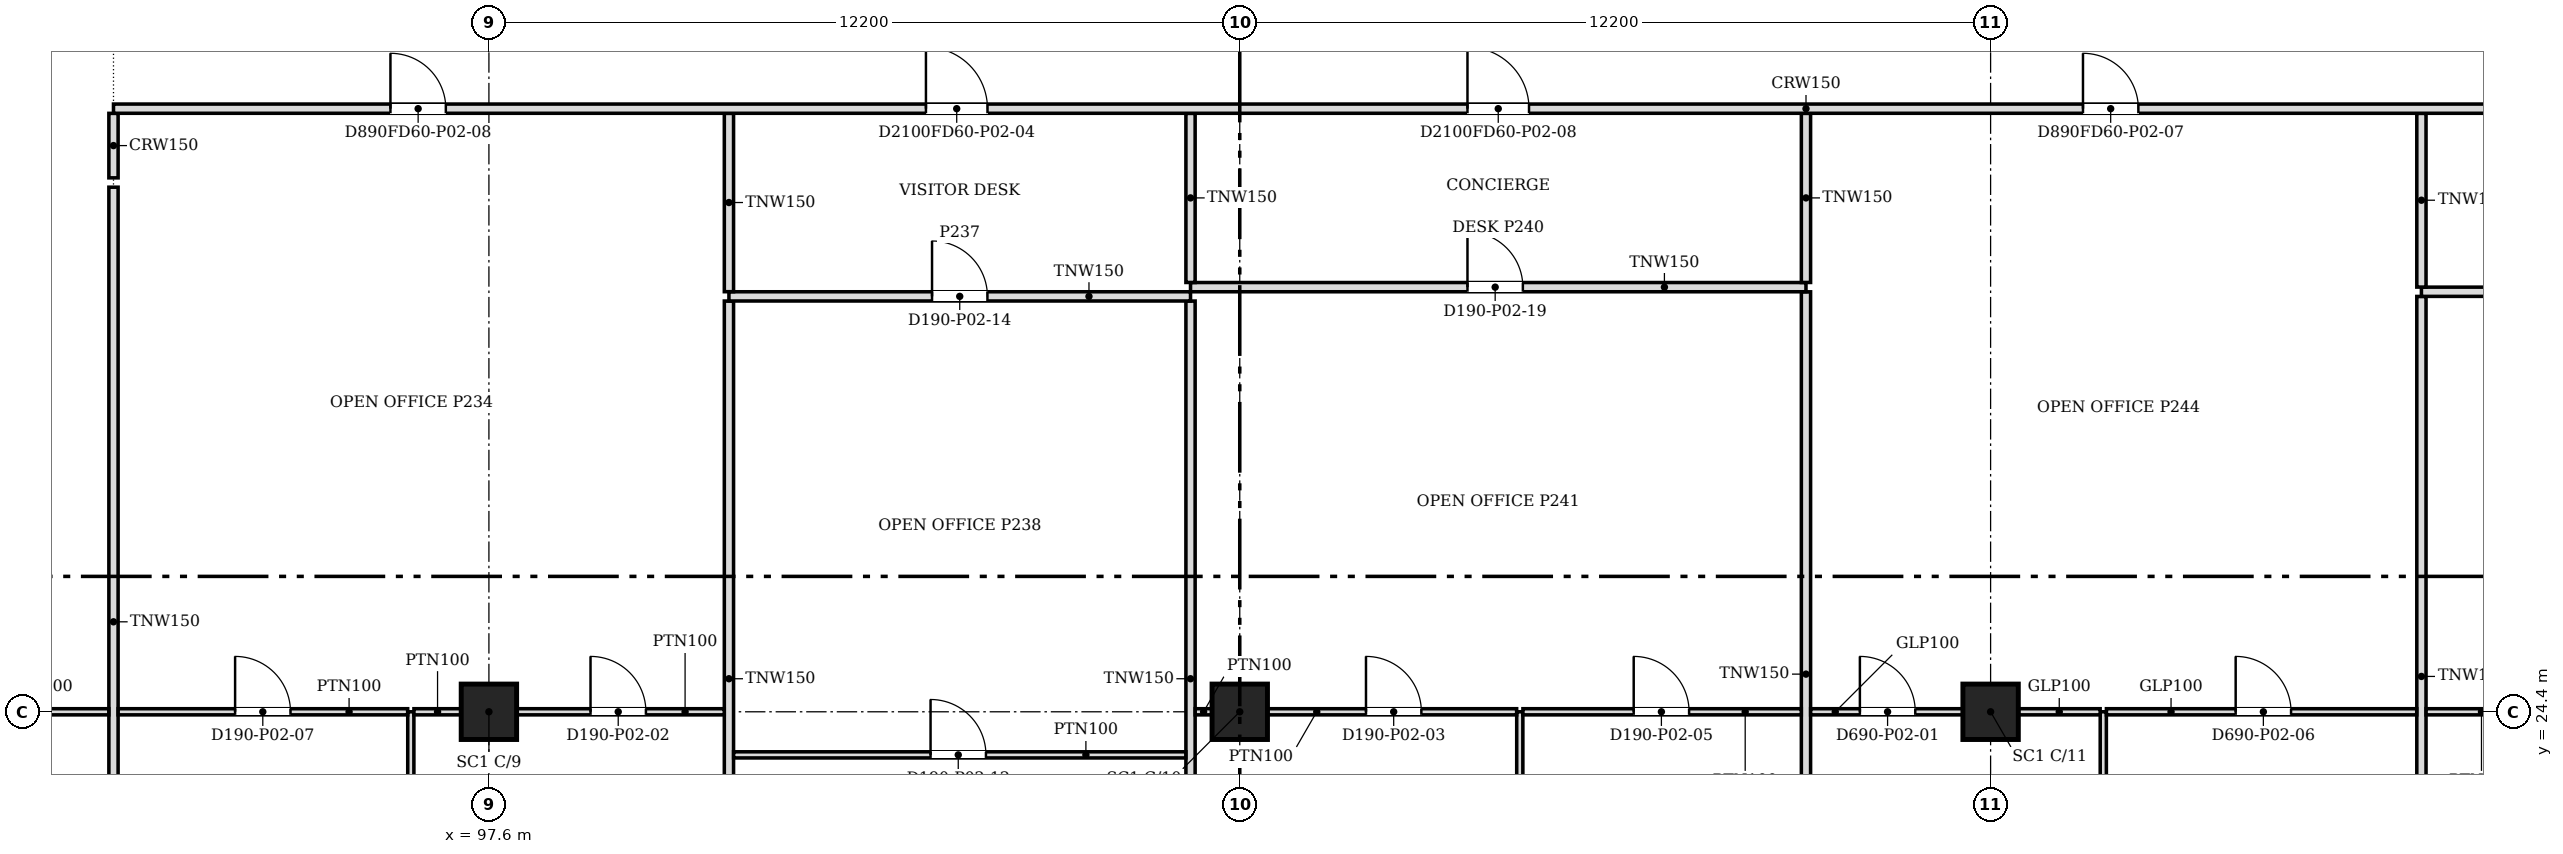
"""IFC4 building model, lengths in metres.
Left out: names, types, materials, properties, quantities, classifications, styles, units other than length and angle.
Written with IfcOpenShell. Run it as: python <this file> out.ifc"""

import sys

from ifc_helpers import new_model, si_unit, direction, frame, frame_2d, origin, origin_2d, place, context, subcontext, project, spatial, rectangle, extrude, source, transform, mapped, element, fill, save


model = new_model("IFC4")
c1 = context("Model", 3, precision=1e-05, world=origin(), true_north=direction((0.0, 1.0)))
c2 = subcontext(c1, "Body", "Model", "MODEL_VIEW")
j1 = project(units=[si_unit("LENGTHUNIT", "METRE"), si_unit("PLANEANGLEUNIT", "RADIAN")], contexts=[c1])
p1 = place(None, origin())
s1 = spatial("IfcSite", under=j1, at=p1, CompositionType="ELEMENT")
p2 = place(p1, origin())
s2 = spatial("IfcBuilding", under=s1, at=p2, CompositionType="ELEMENT")
p3 = place(p2, frame((0.0, 0.0, 7.2)))
s3 = spatial("IfcBuildingStorey", under=s2, at=p3, CompositionType="ELEMENT", Elevation=7.2)
for number, where, z_axis, x_axis in (
    (1, (97.6, 24.4, 0.0), (0.0, 0.0, 1.0), (1.0, 0.0, 0.0)),
    (2, (109.8, 24.4, 0.0), (0.0, 0.0, 1.0), (1.0, 0.0, 0.0)),
    (3, (122.0, 24.4, 0.0), (0.0, 0.0, 1.0), (1.0, 0.0, 0.0)),
):
    element("IfcColumn", number, at=place(p3, frame(where, z_axis=z_axis, x_axis=x_axis)), inside=s3, PredefinedType="COLUMN", context=c2, shape_type="SweptSolid", body=[
        extrude(rectangle(XDim=0.9, YDim=0.9, at=origin_2d()), origin(), (0.0, 0.0, 1.0), 4.55),
    ])
p4 = place(p3, frame((91.5, 18.8, 0.0), z_axis=(0.0, 0.0, 1.0), x_axis=(0.0, 1.0, 0.0)))
e4 = element("IfcWall", 4, at=p4, inside=s3, PredefinedType="PARTITIONING", context=c2, shape_type="SweptSolid", body=[
    extrude(rectangle(XDim=14.124, YDim=0.15, at=frame_2d((7.062, 0.0))), origin(), (0.0, 0.0, 1.0), 3.715),
])
p5 = place(p3, frame((96.331, 18.8, 0.0), z_axis=(0.0, 0.0, 1.0), x_axis=(0.0, 1.0, 0.0)))
e5 = element("IfcWall", 5, at=p5, inside=s3, PredefinedType="PARTITIONING", context=c2, shape_type="SweptSolid", body=[
    extrude(rectangle(XDim=5.6, YDim=0.1, at=frame_2d((2.8, 0.0))), origin(), (0.0, 0.0, 1.0), 3.715),
])
for number, where, z_axis, x_axis in (
    (6, (101.5, 18.8, 0.0), (0.0, 0.0, 1.0), (0.0, 1.0, 0.0)),
    (7, (109.0, 18.8, 0.0), (0.0, 0.0, 1.0), (0.0, 1.0, 0.0)),
):
    element("IfcWall", number, at=place(p3, frame(where, z_axis=z_axis, x_axis=x_axis)), inside=s3, PredefinedType="PARTITIONING", context=c2, shape_type="SweptSolid", body=[
        extrude(rectangle(XDim=12.274, YDim=0.15, at=frame_2d((6.137, 0.0))), origin(), (0.0, 0.0, 1.0), 3.715),
    ])
p6 = place(p3, frame((114.35, 18.8, 0.0), z_axis=(0.0, 0.0, 1.0), x_axis=(0.0, 1.0, 0.0)))
e8 = element("IfcWall", 8, at=p6, inside=s3, PredefinedType="PARTITIONING", context=c2, shape_type="SweptSolid", body=[
    extrude(rectangle(XDim=5.6, YDim=0.1, at=frame_2d((2.8, 0.0))), origin(), (0.0, 0.0, 1.0), 3.715),
])
p7 = place(p3, frame((119.0, 18.8, 0.0), z_axis=(0.0, 0.0, 1.0), x_axis=(0.0, 1.0, 0.0)))
e9 = element("IfcWall", 9, at=p7, inside=s3, PredefinedType="PARTITIONING", context=c2, shape_type="SweptSolid", body=[
    extrude(rectangle(XDim=12.424, YDim=0.15, at=frame_2d((6.212, 0.0))), origin(), (0.0, 0.0, 1.0), 3.715),
])
p8 = place(p3, frame((123.831, 18.8, 0.0), z_axis=(0.0, 0.0, 1.0), x_axis=(0.0, 1.0, 0.0)))
e10 = element("IfcWall", 10, at=p8, inside=s3, PredefinedType="PARTITIONING", context=c2, shape_type="SweptSolid", body=[
    extrude(rectangle(XDim=5.6, YDim=0.1, at=frame_2d((2.8, 0.0))), origin(), (0.0, 0.0, 1.0), 3.715),
])
p9 = place(p3, frame((129.0, 18.8, 0.0), z_axis=(0.0, 0.0, 1.0), x_axis=(0.0, 1.0, 0.0)))
e11 = element("IfcWall", 11, at=p9, inside=s3, PredefinedType="PARTITIONING", context=c2, shape_type="SweptSolid", body=[
    extrude(rectangle(XDim=12.349, YDim=0.15, at=frame_2d((6.174, 0.0))), origin(), (0.0, 0.0, 1.0), 3.715),
])
p10 = place(p3, frame((108.924, 23.7, 0.0), z_axis=(0.0, 0.0, 1.0), x_axis=(-1.0, 0.0, 0.0)))
e12 = element("IfcWall", 12, at=p10, inside=s3, PredefinedType="PARTITIONING", context=c2, shape_type="SweptSolid", body=[
    extrude(rectangle(XDim=7.348, YDim=0.1, at=frame_2d((3.674, 0.0))), origin(), (0.0, 0.0, 1.0), 3.715),
])
m1 = source(origin(), c2, "Body", "SweptSolid", [
    extrude(rectangle(XDim=0.9, YDim=2.1, at=frame_2d((0.45, 1.05))), frame((0.0, 0.06, 0.0), z_axis=(0.0, -1.0, 0.0), x_axis=(1.0, 0.0, 0.0)), (0.0, 0.0, 1.0), 0.12),
])
p11 = place(p10, frame((3.248, 0.0, 0.0)))
e13 = element("IfcOpeningElement", 13, at=p11, cuts=e12, PredefinedType="OPENING", context=c2, shape_type="MappedRepresentation", body=[
    mapped(m1, transform((0.0, 0.0, 0.0), scale=1.0)),
])
p12 = place(p3, frame((91.424, 24.4, 0.0), z_axis=(0.0, 0.0, 1.0), x_axis=(-1.0, 0.0, 0.0)))
e14 = element("IfcWall", 14, at=p12, inside=s3, PredefinedType="PARTITIONING", context=c2, shape_type="SweptSolid", body=[
    extrude(rectangle(XDim=5.323, YDim=0.1, at=frame_2d((2.662, 0.0))), origin(), (0.0, 0.0, 1.0), 3.715),
])
p13 = place(p12, frame((2.223, 0.0, 0.0)))
e15 = element("IfcOpeningElement", 15, at=p13, cuts=e14, PredefinedType="OPENING", context=c2, shape_type="MappedRepresentation", body=[
    mapped(m1, transform((0.0, 0.0, 0.0), scale=1.0)),
])
p14 = place(p3, frame((96.28, 24.4, 0.0), z_axis=(0.0, 0.0, 1.0), x_axis=(-1.0, 0.0, 0.0)))
e16 = element("IfcWall", 16, at=p14, inside=s3, PredefinedType="PARTITIONING", context=c2, shape_type="SweptSolid", body=[
    extrude(rectangle(XDim=4.704, YDim=0.1, at=frame_2d((2.352, 0.0))), origin(), (0.0, 0.0, 1.0), 3.715),
])
p15 = place(p14, frame((1.904, 0.0, 0.0)))
e17 = element("IfcOpeningElement", 17, at=p15, cuts=e16, PredefinedType="OPENING", context=c2, shape_type="MappedRepresentation", body=[
    mapped(m1, transform((0.0, 0.0, 0.0), scale=1.0)),
])
p16 = place(p3, frame((96.382, 24.4, 0.0), z_axis=(0.0, 0.0, 1.0), x_axis=(1.0, 0.0, 0.0)))
e18 = element("IfcWall", 18, at=p16, inside=s3, PredefinedType="PARTITIONING", context=c2, shape_type="SweptSolid", body=[
    extrude(rectangle(XDim=0.767, YDim=0.1, at=frame_2d((0.384, 0.0))), origin(), (0.0, 0.0, 1.0), 3.715),
])
p17 = place(p3, frame((101.424, 24.4, 0.0), z_axis=(0.0, 0.0, 1.0), x_axis=(-1.0, 0.0, 0.0)))
e19 = element("IfcWall", 19, at=p17, inside=s3, PredefinedType="PARTITIONING", context=c2, shape_type="SweptSolid", body=[
    extrude(rectangle(XDim=3.373, YDim=0.1, at=frame_2d((1.687, 0.0))), origin(), (0.0, 0.0, 1.0), 3.715),
])
p18 = place(p17, frame((1.273, 0.0, 0.0)))
e20 = element("IfcOpeningElement", 20, at=p18, cuts=e19, PredefinedType="OPENING", context=c2, shape_type="MappedRepresentation", body=[
    mapped(m1, transform((0.0, 0.0, 0.0), scale=1.0)),
])
p19 = place(p3, frame((109.076, 24.4, 0.0), z_axis=(0.0, 0.0, 1.0), x_axis=(1.0, 0.0, 0.0)))
e21 = element("IfcWall", 21, at=p19, inside=s3, PredefinedType="PARTITIONING", context=c2, shape_type="SweptSolid", body=[
    extrude(rectangle(XDim=0.273, YDim=0.1, at=frame_2d((0.137, 0.0))), origin(), (0.0, 0.0, 1.0), 3.715),
])
p20 = place(p3, frame((114.299, 24.4, 0.0), z_axis=(0.0, 0.0, 1.0), x_axis=(-1.0, 0.0, 0.0)))
e22 = element("IfcWall", 22, at=p20, inside=s3, PredefinedType="PARTITIONING", context=c2, shape_type="SweptSolid", body=[
    extrude(rectangle(XDim=4.048, YDim=0.1, at=frame_2d((2.024, 0.0))), origin(), (0.0, 0.0, 1.0), 3.715),
])
p21 = place(p20, frame((1.548, 0.0, 0.0)))
e23 = element("IfcOpeningElement", 23, at=p21, cuts=e22, PredefinedType="OPENING", context=c2, shape_type="MappedRepresentation", body=[
    mapped(m1, transform((0.0, 0.0, 0.0), scale=1.0)),
])
p22 = place(p3, frame((118.924, 24.4, 0.0), z_axis=(0.0, 0.0, 1.0), x_axis=(-1.0, 0.0, 0.0)))
e24 = element("IfcWall", 24, at=p22, inside=s3, PredefinedType="PARTITIONING", context=c2, shape_type="SweptSolid", body=[
    extrude(rectangle(XDim=4.523, YDim=0.1, at=frame_2d((2.262, 0.0))), origin(), (0.0, 0.0, 1.0), 3.715),
])
p23 = place(p22, frame((1.823, 0.0, 0.0)))
e25 = element("IfcOpeningElement", 25, at=p23, cuts=e24, PredefinedType="OPENING", context=c2, shape_type="MappedRepresentation", body=[
    mapped(m1, transform((0.0, 0.0, 0.0), scale=1.0)),
])
p24 = place(p3, frame((121.549, 24.4, 0.0), z_axis=(0.0, 0.0, 1.0), x_axis=(-1.0, 0.0, 0.0)))
e26 = element("IfcWall", 26, at=p24, inside=s3, PredefinedType="PARTITIONING", context=c2, shape_type="SweptSolid", body=[
    extrude(rectangle(XDim=2.473, YDim=0.1, at=frame_2d((1.237, 0.0))), origin(), (0.0, 0.0, 1.0), 3.715),
])
p25 = place(p24, frame((0.773, 0.0, 0.0)))
e27 = element("IfcOpeningElement", 27, at=p25, cuts=e26, PredefinedType="OPENING", context=c2, shape_type="MappedRepresentation", body=[
    mapped(m1, transform((0.0, 0.0, 0.0), scale=1.0)),
])
p26 = place(p3, frame((122.451, 24.4, 0.0), z_axis=(0.0, 0.0, 1.0), x_axis=(1.0, 0.0, 0.0)))
e28 = element("IfcWall", 28, at=p26, inside=s3, PredefinedType="PARTITIONING", context=c2, shape_type="SweptSolid", body=[
    extrude(rectangle(XDim=1.329, YDim=0.1, at=frame_2d((0.665, 0.0))), origin(), (0.0, 0.0, 1.0), 3.715),
])
p27 = place(p3, frame((128.924, 24.4, 0.0), z_axis=(0.0, 0.0, 1.0), x_axis=(-1.0, 0.0, 0.0)))
e29 = element("IfcWall", 29, at=p27, inside=s3, PredefinedType="PARTITIONING", context=c2, shape_type="SweptSolid", body=[
    extrude(rectangle(XDim=5.042, YDim=0.1, at=frame_2d((2.521, 0.0))), origin(), (0.0, 0.0, 1.0), 3.715),
])
p28 = place(p27, frame((2.042, 0.0, 0.0)))
e30 = element("IfcOpeningElement", 30, at=p28, cuts=e29, PredefinedType="OPENING", context=c2, shape_type="MappedRepresentation", body=[
    mapped(m1, transform((0.0, 0.0, 0.0), scale=1.0)),
])
p29 = place(p3, frame((133.516, 24.4, 0.0), z_axis=(0.0, 0.0, 1.0), x_axis=(-1.0, 0.0, 0.0)))
e31 = element("IfcWall", 31, at=p29, inside=s3, PredefinedType="PARTITIONING", context=c2, shape_type="SweptSolid", body=[
    extrude(rectangle(XDim=4.44, YDim=0.1, at=frame_2d((2.22, 0.0))), origin(), (0.0, 0.0, 1.0), 3.715),
])
p30 = place(p29, frame((1.74, 0.0, 0.0)))
e32 = element("IfcOpeningElement", 32, at=p30, cuts=e31, PredefinedType="OPENING", context=c2, shape_type="MappedRepresentation", body=[
    mapped(m1, transform((0.0, 0.0, 0.0), scale=1.0)),
])
p31 = place(p3, frame((109.0, 31.15, 0.0), z_axis=(0.0, 0.0, 1.0), x_axis=(-1.0, 0.0, 0.0)))
e33 = element("IfcWall", 33, at=p31, inside=s3, PredefinedType="PARTITIONING", context=c2, shape_type="SweptSolid", body=[
    extrude(rectangle(XDim=7.5, YDim=0.15, at=frame_2d((3.75, 0.0))), origin(), (0.0, 0.0, 1.0), 3.715),
])
m2 = source(origin(), c2, "Body", "SweptSolid", [
    extrude(rectangle(XDim=0.9, YDim=2.1, at=frame_2d((0.45, 1.05))), frame((0.0, 0.085, 0.0), z_axis=(0.0, -1.0, 0.0), x_axis=(1.0, 0.0, 0.0)), (0.0, 0.0, 1.0), 0.17),
])
p32 = place(p31, frame((3.3, 0.0, 0.0)))
e34 = element("IfcOpeningElement", 34, at=p32, cuts=e33, PredefinedType="OPENING", context=c2, shape_type="MappedRepresentation", body=[
    mapped(m2, transform((0.0, 0.0, 0.0), scale=1.0)),
])
p33 = place(p3, frame((101.5, 31.226, 0.0), z_axis=(0.0, 0.0, 1.0), x_axis=(0.0, 1.0, 0.0)))
e35 = element("IfcWall", 35, at=p33, inside=s3, PredefinedType="PARTITIONING", context=c2, shape_type="SweptSolid", body=[
    extrude(rectangle(XDim=2.898, YDim=0.15, at=frame_2d((1.449, 0.0))), origin(), (0.0, 0.0, 1.0), 3.715),
])
p34 = place(p3, frame((138.2, 31.225, 0.0), z_axis=(0.0, 0.0, 1.0), x_axis=(-1.0, 0.0, 0.0)))
e36 = element("IfcWall", 36, at=p34, inside=s3, PredefinedType="PARTITIONING", context=c2, shape_type="SweptSolid", body=[
    extrude(rectangle(XDim=9.2, YDim=0.15, at=frame_2d((4.6, 0.0))), origin(), (0.0, 0.0, 1.0), 3.715),
])
p35 = place(p34, frame((4.2, 0.0, 0.0)))
e37 = element("IfcOpeningElement", 37, at=p35, cuts=e36, PredefinedType="OPENING", context=c2, shape_type="MappedRepresentation", body=[
    mapped(m2, transform((0.0, 0.0, 0.0), scale=1.0)),
])
p36 = place(p3, frame((119.0, 31.3, 0.0), z_axis=(0.0, 0.0, 1.0), x_axis=(-1.0, 0.0, 0.0)))
e38 = element("IfcWall", 38, at=p36, inside=s3, PredefinedType="PARTITIONING", context=c2, shape_type="SweptSolid", body=[
    extrude(rectangle(XDim=10.0, YDim=0.15, at=frame_2d((5.0, 0.0))), origin(), (0.0, 0.0, 1.0), 3.715),
])
p37 = place(p36, frame((4.6, 0.0, 0.0)))
e39 = element("IfcOpeningElement", 39, at=p37, cuts=e38, PredefinedType="OPENING", context=c2, shape_type="MappedRepresentation", body=[
    mapped(m2, transform((0.0, 0.0, 0.0), scale=1.0)),
])
p38 = place(p3, frame((129.0, 31.301, 0.0), z_axis=(0.0, 0.0, 1.0), x_axis=(0.0, 1.0, 0.0)))
e40 = element("IfcWall", 40, at=p38, inside=s3, PredefinedType="PARTITIONING", context=c2, shape_type="SweptSolid", body=[
    extrude(rectangle(XDim=2.823, YDim=0.15, at=frame_2d((1.412, 0.0))), origin(), (0.0, 0.0, 1.0), 3.715),
])
for number, where, z_axis, x_axis in (
    (41, (109.0, 31.376, 0.0), (0.0, 0.0, 1.0), (0.0, 1.0, 0.0)),
    (42, (119.0, 31.376, 0.0), (0.0, 0.0, 1.0), (0.0, 1.0, 0.0)),
):
    element("IfcWall", number, at=place(p3, frame(where, z_axis=z_axis, x_axis=x_axis)), inside=s3, PredefinedType="PARTITIONING", context=c2, shape_type="SweptSolid", body=[
        extrude(rectangle(XDim=2.748, YDim=0.15, at=frame_2d((1.374, 0.0))), origin(), (0.0, 0.0, 1.0), 3.715),
    ])
p39 = place(p3, frame((91.5, 33.0, 0.0), z_axis=(0.0, 0.0, 1.0), x_axis=(-1.0, 0.0, 0.0)))
e43 = element("IfcWall", 43, at=p39, inside=s3, PredefinedType="PARTITIONING", context=c2, shape_type="SweptSolid", body=[
    extrude(rectangle(XDim=30.5, YDim=0.15, at=frame_2d((15.25, 0.0))), origin(), (0.0, 0.0, 1.0), 3.715),
])
p40 = place(p39, frame((26.3, 0.0, 0.0)))
e44 = element("IfcOpeningElement", 44, at=p40, cuts=e43, PredefinedType="OPENING", context=c2, shape_type="MappedRepresentation", body=[
    mapped(m2, transform((0.0, 0.0, 0.0), scale=1.0)),
])
m3 = source(origin(), c2, "Body", "SweptSolid", [
    extrude(rectangle(XDim=1.0, YDim=2.1, at=frame_2d((0.5, 1.05))), frame((0.0, 0.085, 0.0), z_axis=(0.0, -1.0, 0.0), x_axis=(1.0, 0.0, 0.0)), (0.0, 0.0, 1.0), 0.17),
])
p41 = place(p39, frame((17.5, 0.0, 0.0)))
e45 = element("IfcOpeningElement", 45, at=p41, cuts=e43, PredefinedType="OPENING", context=c2, shape_type="MappedRepresentation", body=[
    mapped(m3, transform((0.0, 0.0, 0.0), scale=1.0)),
])
p42 = place(p39, frame((6.1, 0.0, 0.0)))
e46 = element("IfcOpeningElement", 46, at=p42, cuts=e43, PredefinedType="OPENING", context=c2, shape_type="MappedRepresentation", body=[
    mapped(m2, transform((0.0, 0.0, 0.0), scale=1.0)),
])
p43 = place(p3, frame((91.5, 33.076, 0.0), z_axis=(0.0, 0.0, 1.0), x_axis=(0.0, 1.0, 0.0)))
e47 = element("IfcWall", 47, at=p43, inside=s3, PredefinedType="PARTITIONING", context=c2, shape_type="SweptSolid", body=[
    extrude(rectangle(XDim=1.048, YDim=0.15, at=frame_2d((0.524, 0.0))), origin(), (0.0, 0.0, 1.0), 3.715),
])
p44 = place(p3, frame((138.2, 34.2, 0.0), z_axis=(0.0, 0.0, 1.0), x_axis=(-1.0, 0.0, 0.0)))
e48 = element("IfcWall", 48, at=p44, inside=s3, PredefinedType="PARTITIONING", context=c2, shape_type="SweptSolid", body=[
    extrude(rectangle(XDim=46.7, YDim=0.15, at=frame_2d((23.35, 0.0))), origin(), (0.0, 0.0, 1.0), 3.715),
])
p45 = place(p44, frame((32.499, 0.0, 0.0)))
e49 = element("IfcOpeningElement", 49, at=p45, cuts=e48, PredefinedType="OPENING", context=c2, shape_type="MappedRepresentation", body=[
    mapped(m3, transform((0.0, 0.0, 0.0), scale=1.0)),
])
p46 = place(p44, frame((4.099, 0.0, 0.0)))
e50 = element("IfcOpeningElement", 50, at=p46, cuts=e48, PredefinedType="OPENING", context=c2, shape_type="MappedRepresentation", body=[
    mapped(m3, transform((0.0, 0.0, 0.0), scale=1.0)),
])
p47 = place(p44, frame((13.799, 0.0, 0.0)))
e51 = element("IfcOpeningElement", 51, at=p47, cuts=e48, PredefinedType="OPENING", context=c2, shape_type="MappedRepresentation", body=[
    mapped(m2, transform((0.0, 0.0, 0.0), scale=1.0)),
])
p48 = place(p44, frame((41.3, 0.0, 0.0)))
e52 = element("IfcOpeningElement", 52, at=p48, cuts=e48, PredefinedType="OPENING", context=c2, shape_type="MappedRepresentation", body=[
    mapped(m2, transform((0.0, 0.0, 0.0), scale=1.0)),
])
p49 = place(p44, frame((23.7, 0.0, 0.0)))
e53 = element("IfcOpeningElement", 53, at=p49, cuts=e48, PredefinedType="OPENING", context=c2, shape_type="MappedRepresentation", body=[
    mapped(m3, transform((0.0, 0.0, 0.0), scale=1.0)),
])
m4 = source(origin(), c2, "Body", "SweptSolid", [
    extrude(rectangle(XDim=0.9, YDim=2.1, at=frame_2d((0.45, 1.05))), frame((0.0, 0.025, 0.0), z_axis=(0.0, -1.0, 0.0), x_axis=(1.0, 0.0, 0.0)), (0.0, 0.0, 1.0), 0.05),
])
p50 = place(p25, origin())
e54 = element("IfcDoor", 54, at=p50, inside=s3, OperationType="SINGLE_SWING_RIGHT", PredefinedType="DOOR", context=c2, shape_type="MappedRepresentation", body=[
    mapped(m4, transform((0.0, 0.0, 0.0), scale=1.0)),
])
fill(e27, e54)
p51 = place(p18, origin())
e55 = element("IfcDoor", 55, at=p51, inside=s3, OperationType="SINGLE_SWING_RIGHT", PredefinedType="DOOR", context=c2, shape_type="MappedRepresentation", body=[
    mapped(m4, transform((0.0, 0.0, 0.0), scale=1.0)),
])
fill(e20, e55)
p52 = place(p21, origin())
e56 = element("IfcDoor", 56, at=p52, inside=s3, OperationType="SINGLE_SWING_RIGHT", PredefinedType="DOOR", context=c2, shape_type="MappedRepresentation", body=[
    mapped(m4, transform((0.0, 0.0, 0.0), scale=1.0)),
])
fill(e23, e56)
p53 = place(p23, origin())
e57 = element("IfcDoor", 57, at=p53, inside=s3, OperationType="SINGLE_SWING_RIGHT", PredefinedType="DOOR", context=c2, shape_type="MappedRepresentation", body=[
    mapped(m4, transform((0.0, 0.0, 0.0), scale=1.0)),
])
fill(e25, e57)
p54 = place(p15, origin())
e58 = element("IfcDoor", 58, at=p54, inside=s3, OperationType="SINGLE_SWING_RIGHT", PredefinedType="DOOR", context=c2, shape_type="MappedRepresentation", body=[
    mapped(m4, transform((0.0, 0.0, 0.0), scale=1.0)),
])
fill(e17, e58)
p55 = place(p28, origin())
e59 = element("IfcDoor", 59, at=p55, inside=s3, OperationType="SINGLE_SWING_RIGHT", PredefinedType="DOOR", context=c2, shape_type="MappedRepresentation", body=[
    mapped(m4, transform((0.0, 0.0, 0.0), scale=1.0)),
])
fill(e30, e59)
p56 = place(p11, origin())
e60 = element("IfcDoor", 60, at=p56, inside=s3, OperationType="SINGLE_SWING_RIGHT", PredefinedType="DOOR", context=c2, shape_type="MappedRepresentation", body=[
    mapped(m4, transform((0.0, 0.0, 0.0), scale=1.0)),
])
fill(e13, e60)
m5 = source(origin(), c2, "Body", "SweptSolid", [
    extrude(rectangle(XDim=1.0, YDim=2.1, at=frame_2d((0.5, 1.05))), frame((0.0, 0.025, 0.0), z_axis=(0.0, -1.0, 0.0), x_axis=(1.0, 0.0, 0.0)), (0.0, 0.0, 1.0), 0.05),
])
p57 = place(p45, origin())
e61 = element("IfcDoor", 61, at=p57, inside=s3, OperationType="SINGLE_SWING_RIGHT", PredefinedType="DOOR", context=c2, shape_type="MappedRepresentation", body=[
    mapped(m5, transform((0.0, 0.0, 0.0), scale=1.0)),
])
fill(e49, e61)
p58 = place(p32, origin())
e62 = element("IfcDoor", 62, at=p58, inside=s3, OperationType="SINGLE_SWING_RIGHT", PredefinedType="DOOR", context=c2, shape_type="MappedRepresentation", body=[
    mapped(m4, transform((0.0, 0.0, 0.0), scale=1.0)),
])
fill(e34, e62)
p59 = place(p47, origin())
e63 = element("IfcDoor", 63, at=p59, inside=s3, OperationType="SINGLE_SWING_RIGHT", PredefinedType="DOOR", context=c2, shape_type="MappedRepresentation", body=[
    mapped(m4, transform((0.0, 0.0, 0.0), scale=1.0)),
])
fill(e51, e63)
p60 = place(p48, origin())
e64 = element("IfcDoor", 64, at=p60, inside=s3, OperationType="SINGLE_SWING_RIGHT", PredefinedType="DOOR", context=c2, shape_type="MappedRepresentation", body=[
    mapped(m4, transform((0.0, 0.0, 0.0), scale=1.0)),
])
fill(e52, e64)
p61 = place(p49, origin())
e65 = element("IfcDoor", 65, at=p61, inside=s3, OperationType="SINGLE_SWING_RIGHT", PredefinedType="DOOR", context=c2, shape_type="MappedRepresentation", body=[
    mapped(m5, transform((0.0, 0.0, 0.0), scale=1.0)),
])
fill(e53, e65)
p62 = place(p37, origin())
e66 = element("IfcDoor", 66, at=p62, inside=s3, OperationType="SINGLE_SWING_RIGHT", PredefinedType="DOOR", context=c2, shape_type="MappedRepresentation", body=[
    mapped(m4, transform((0.0, 0.0, 0.0), scale=1.0)),
])
fill(e39, e66)
save(model, sys.argv[1])
